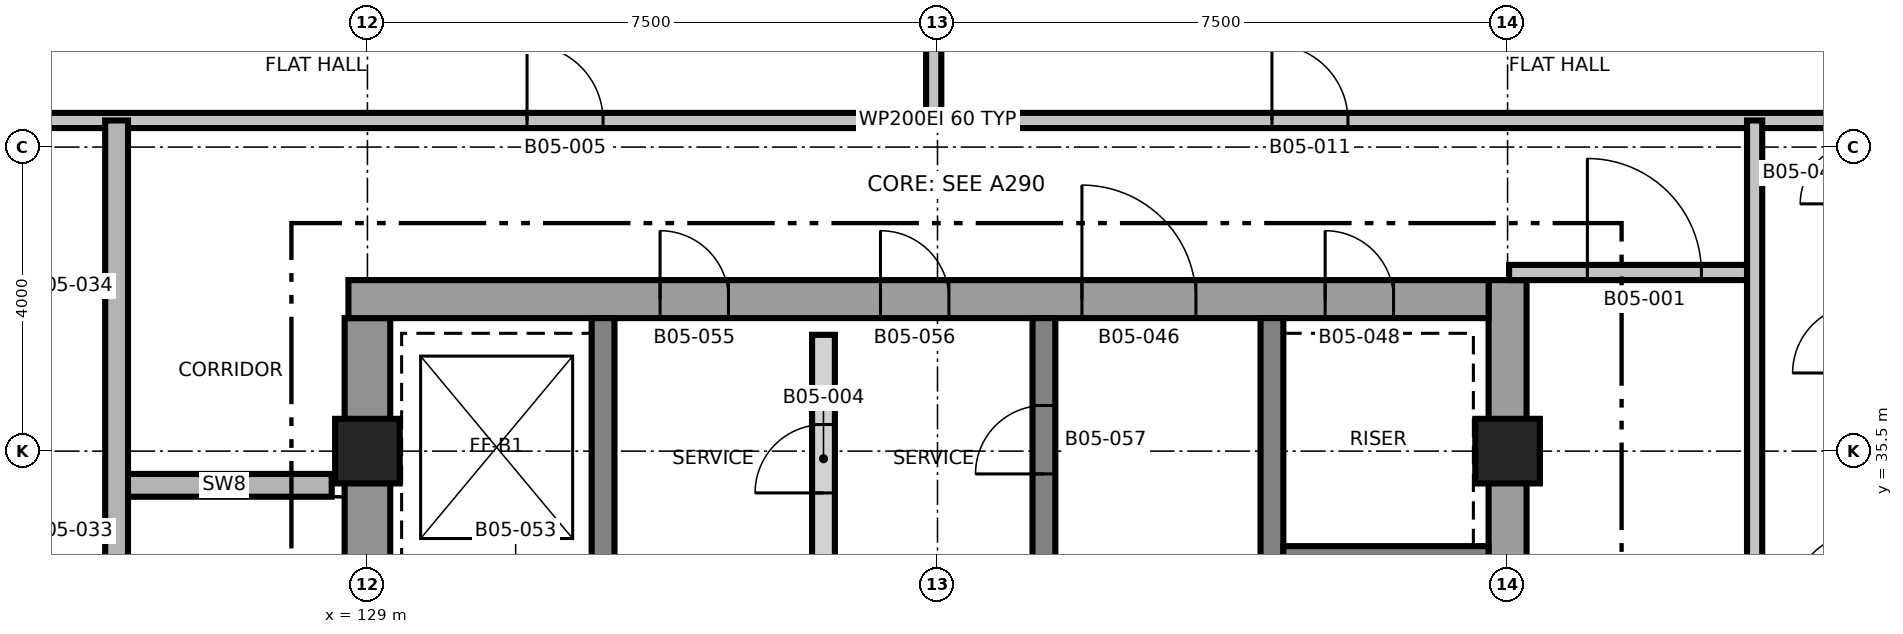
"""IFC4 building model, lengths in metres.
Left out: names, types, materials, properties, quantities, classifications, styles, units other than length and angle.
Written with IfcOpenShell. Run it as: python <this file> out.ifc"""

import sys

from ifc_helpers import new_model, si_unit, direction, frame, frame_2d, origin, origin_2d, place, context, subcontext, project, spatial, rectangle, extrude, element, fill, save


model = new_model("IFC4")
c1 = context("Model", 3, precision=1e-05, world=origin(), true_north=direction((0.0, 1.0)))
c2 = subcontext(c1, "Body", "Model", "MODEL_VIEW")
j1 = project(units=[si_unit("LENGTHUNIT", "METRE"), si_unit("PLANEANGLEUNIT", "RADIAN")], contexts=[c1])
p1 = place(None, origin())
s1 = spatial("IfcSite", under=j1, at=p1, CompositionType="ELEMENT")
p2 = place(p1, origin())
s2 = spatial("IfcBuilding", under=s1, at=p2, CompositionType="ELEMENT")
p3 = place(p2, frame((0.0, 0.0, 70.5)))
s3 = spatial("IfcBuildingStorey", under=s2, at=p3, CompositionType="ELEMENT", Elevation=70.5)
p4 = place(p3, frame((129.0, 24.75, 0.0), z_axis=(0.0, 0.0, 1.0), x_axis=(0.0, 1.0, 0.0)))
e1 = element("IfcWall", 1, at=p4, inside=s3, PredefinedType="SHEAR", context=c2, shape_type="SweptSolid", body=[
    extrude(rectangle(XDim=12.5, YDim=0.6, at=frame_2d((6.25, 0.0))), origin(), (0.0, 0.0, 1.0), 3.7),
])
p5 = place(p4, frame((5.15, 0.0, 0.0)))
e2 = element("IfcOpeningElement", 2, at=p5, cuts=e1, PredefinedType="OPENING", context=c2, shape_type="SweptSolid", body=[
    extrude(rectangle(XDim=1.0, YDim=2.1, at=frame_2d((0.5, 1.05))), frame((0.0, 0.31, 0.0), z_axis=(0.0, -1.0, 0.0), x_axis=(1.0, 0.0, 0.0)), (0.0, 0.0, 1.0), 0.62),
])
p6 = place(p3, frame((144.0, 24.25, 0.0), z_axis=(0.0, 0.0, 1.0), x_axis=(0.0, 1.0, 0.0)))
e3 = element("IfcWall", 3, at=p6, inside=s3, PredefinedType="SHEAR", context=c2, shape_type="SweptSolid", body=[
    extrude(rectangle(XDim=13.5, YDim=0.5, at=frame_2d((6.75, 0.0))), origin(), (0.0, 0.0, 1.0), 3.7),
])
p7 = place(p3, frame((128.75, 37.5, 0.0), z_axis=(0.0, 0.0, 1.0), x_axis=(1.0, 0.0, 0.0)))
e4 = element("IfcWall", 4, at=p7, inside=s3, PredefinedType="SHEAR", context=c2, shape_type="SweptSolid", body=[
    extrude(rectangle(XDim=15.0, YDim=0.5, at=frame_2d((7.5, 0.0))), origin(), (0.0, 0.0, 1.0), 3.7),
])
p8 = place(p7, frame((9.65, 0.0, 0.0)))
e5 = element("IfcOpeningElement", 5, at=p8, cuts=e4, PredefinedType="OPENING", context=c2, shape_type="SweptSolid", body=[
    extrude(rectangle(XDim=1.5, YDim=2.1, at=frame_2d((0.75, 1.05))), frame((0.0, 0.26, 0.0), z_axis=(0.0, -1.0, 0.0), x_axis=(1.0, 0.0, 0.0)), (0.0, 0.0, 1.0), 0.52),
])
p9 = place(p7, frame((12.85, 0.0, 0.0)))
e6 = element("IfcOpeningElement", 6, at=p9, cuts=e4, PredefinedType="OPENING", context=c2, shape_type="SweptSolid", body=[
    extrude(rectangle(XDim=0.9, YDim=2.1, at=frame_2d((0.45, 1.05))), frame((0.0, 0.26, 0.0), z_axis=(0.0, -1.0, 0.0), x_axis=(1.0, 0.0, 0.0)), (0.0, 0.0, 1.0), 0.52),
])
p10 = place(p7, frame((4.1, 0.0, 0.0)))
e7 = element("IfcOpeningElement", 7, at=p10, cuts=e4, PredefinedType="OPENING", context=c2, shape_type="SweptSolid", body=[
    extrude(rectangle(XDim=0.9, YDim=2.1, at=frame_2d((0.45, 1.05))), frame((0.0, 0.26, 0.0), z_axis=(0.0, -1.0, 0.0), x_axis=(1.0, 0.0, 0.0)), (0.0, 0.0, 1.0), 0.52),
])
p11 = place(p7, frame((7.0, 0.0, 0.0)))
e8 = element("IfcOpeningElement", 8, at=p11, cuts=e4, PredefinedType="OPENING", context=c2, shape_type="SweptSolid", body=[
    extrude(rectangle(XDim=0.9, YDim=2.1, at=frame_2d((0.45, 1.05))), frame((0.0, 0.26, 0.0), z_axis=(0.0, -1.0, 0.0), x_axis=(1.0, 0.0, 0.0)), (0.0, 0.0, 1.0), 0.52),
])
p12 = place(p3, frame((132.1, 24.75, 0.0), z_axis=(0.0, 0.0, 1.0), x_axis=(0.0, 1.0, 0.0)))
e9 = element("IfcWall", 9, at=p12, inside=s3, PredefinedType="SHEAR", context=c2, shape_type="SweptSolid", body=[
    extrude(rectangle(XDim=12.5, YDim=0.3, at=frame_2d((6.25, 0.0))), origin(), (0.0, 0.0, 1.0), 3.7),
])
p13 = place(p12, frame((3.9, 0.0, 0.0)))
e10 = element("IfcOpeningElement", 10, at=p13, cuts=e9, PredefinedType="OPENING", context=c2, shape_type="SweptSolid", body=[
    extrude(rectangle(XDim=1.2, YDim=2.1, at=frame_2d((0.6, 1.05))), frame((0.0, 0.16, 0.0), z_axis=(0.0, -1.0, 0.0), x_axis=(1.0, 0.0, 0.0)), (0.0, 0.0, 1.0), 0.32),
])
p14 = place(p3, frame((137.9, 24.75, 0.0), z_axis=(0.0, 0.0, 1.0), x_axis=(0.0, 1.0, 0.0)))
e11 = element("IfcWall", 11, at=p14, inside=s3, PredefinedType="SHEAR", context=c2, shape_type="SweptSolid", body=[
    extrude(rectangle(XDim=12.5, YDim=0.3, at=frame_2d((6.25, 0.0))), origin(), (0.0, 0.0, 1.0), 3.7),
])
p15 = place(p14, frame((3.95, 0.0, 0.0)))
e12 = element("IfcOpeningElement", 12, at=p15, cuts=e11, PredefinedType="OPENING", context=c2, shape_type="SweptSolid", body=[
    extrude(rectangle(XDim=1.5, YDim=2.1, at=frame_2d((0.75, 1.05))), frame((0.0, 0.16, 0.0), z_axis=(0.0, -1.0, 0.0), x_axis=(1.0, 0.0, 0.0)), (0.0, 0.0, 1.0), 0.32),
])
p16 = place(p14, frame((10.45, 0.0, 0.0)))
e13 = element("IfcOpeningElement", 13, at=p16, cuts=e11, PredefinedType="OPENING", context=c2, shape_type="SweptSolid", body=[
    extrude(rectangle(XDim=0.9, YDim=2.1, at=frame_2d((0.45, 1.05))), frame((0.0, 0.16, 0.0), z_axis=(0.0, -1.0, 0.0), x_axis=(1.0, 0.0, 0.0)), (0.0, 0.0, 1.0), 0.32),
])
p17 = place(p3, frame((140.9, 24.75, 0.0), z_axis=(0.0, 0.0, 1.0), x_axis=(0.0, 1.0, 0.0)))
e14 = element("IfcWall", 14, at=p17, inside=s3, PredefinedType="SHEAR", context=c2, shape_type="SweptSolid", body=[
    extrude(rectangle(XDim=12.5, YDim=0.3, at=frame_2d((6.25, 0.0))), origin(), (0.0, 0.0, 1.0), 3.7),
])
p18 = place(p17, frame((5.9, 0.0, 0.0)))
e15 = element("IfcOpeningElement", 15, at=p18, cuts=e14, PredefinedType="OPENING", context=c2, shape_type="SweptSolid", body=[
    extrude(rectangle(XDim=1.2, YDim=2.1, at=frame_2d((0.6, 1.05))), frame((0.0, 0.16, 0.0), z_axis=(0.0, -1.0, 0.0), x_axis=(1.0, 0.0, 0.0)), (0.0, 0.0, 1.0), 0.32),
])
p19 = place(p3, frame((141.05, 34.1, 0.0), z_axis=(0.0, 0.0, 1.0), x_axis=(1.0, 0.0, 0.0)))
e16 = element("IfcWall", 16, at=p19, inside=s3, PredefinedType="SHEAR", context=c2, shape_type="SweptSolid", body=[
    extrude(rectangle(XDim=2.7, YDim=0.3, at=frame_2d((1.35, 0.0))), origin(), (0.0, 0.0, 1.0), 3.7),
])
for number, where, z_axis, x_axis in (
    (17, (129.0, 35.5, 0.0), (0.0, 0.0, 1.0), (1.0, 0.0, 0.0)),
    (18, (144.0, 35.5, 0.0), (0.0, 0.0, 1.0), (1.0, 0.0, 0.0)),
):
    element("IfcColumn", number, at=place(p3, frame(where, z_axis=z_axis, x_axis=x_axis)), inside=s3, PredefinedType="COLUMN", context=c2, shape_type="SweptSolid", body=[
        extrude(rectangle(XDim=0.85, YDim=0.85, at=origin_2d()), origin(), (0.0, 0.0, 1.0), 3.7),
    ])
p20 = place(p3, frame((125.7, 35.05, 0.0), z_axis=(0.0, 0.0, 1.0), x_axis=(1.0, 0.0, 0.0)))
e19 = element("IfcWall", 19, at=p20, inside=s3, PredefinedType="SHEAR", context=c2, shape_type="SweptSolid", body=[
    extrude(rectangle(XDim=2.83, YDim=0.3, at=frame_2d((1.415, 0.0))), origin(), (0.0, 0.0, 1.0), 3.4),
])
p21 = place(p3, frame((144.02, 37.85, 0.0), z_axis=(0.0, 0.0, 1.0), x_axis=(1.0, 0.0, 0.0)))
e20 = element("IfcWall", 20, at=p21, inside=s3, PredefinedType="PARTITIONING", context=c2, shape_type="SweptSolid", body=[
    extrude(rectangle(XDim=3.23, YDim=0.2, at=frame_2d((1.615, 0.0))), origin(), (0.0, 0.0, 1.0), 3.4),
])
p22 = place(p21, frame((1.03, 0.0, 0.0)))
e21 = element("IfcOpeningElement", 21, at=p22, cuts=e20, PredefinedType="OPENING", context=c2, shape_type="SweptSolid", body=[
    extrude(rectangle(XDim=1.5, YDim=2.1, at=frame_2d((0.75, 1.05))), frame((0.0, 0.11, 0.0), z_axis=(0.0, -1.0, 0.0), x_axis=(1.0, 0.0, 0.0)), (0.0, 0.0, 1.0), 0.22),
])
p23 = place(p3, frame((120.07, 39.85, 0.0), z_axis=(0.0, 0.0, 1.0), x_axis=(1.0, 0.0, 0.0)))
e22 = element("IfcWall", 22, at=p23, inside=s3, PredefinedType="PARTITIONING", context=c2, shape_type="SweptSolid", body=[
    extrude(rectangle(XDim=32.86, YDim=0.2, at=frame_2d((16.43, 0.0))), origin(), (0.0, 0.0, 1.0), 3.4),
])
p24 = place(p23, frame((11.03, 0.0, 0.0)))
e23 = element("IfcOpeningElement", 23, at=p24, cuts=e22, PredefinedType="OPENING", context=c2, shape_type="SweptSolid", body=[
    extrude(rectangle(XDim=1.0, YDim=2.1, at=frame_2d((0.5, 1.05))), frame((0.0, 0.11, 0.0), z_axis=(0.0, -1.0, 0.0), x_axis=(1.0, 0.0, 0.0)), (0.0, 0.0, 1.0), 0.22),
])
p25 = place(p23, frame((20.83, 0.0, 0.0)))
e24 = element("IfcOpeningElement", 24, at=p25, cuts=e22, PredefinedType="OPENING", context=c2, shape_type="SweptSolid", body=[
    extrude(rectangle(XDim=1.0, YDim=2.1, at=frame_2d((0.5, 1.05))), frame((0.0, 0.11, 0.0), z_axis=(0.0, -1.0, 0.0), x_axis=(1.0, 0.0, 0.0)), (0.0, 0.0, 1.0), 0.22),
])
p26 = place(p3, frame((125.7, 22.15, 0.0), z_axis=(0.0, 0.0, 1.0), x_axis=(0.0, 1.0, 0.0)))
e25 = element("IfcWall", 25, at=p26, inside=s3, PredefinedType="SHEAR", context=c2, shape_type="SweptSolid", body=[
    extrude(rectangle(XDim=17.7, YDim=0.3, at=frame_2d((8.85, 0.0))), origin(), (0.0, 0.0, 1.0), 3.4),
])
p27 = place(p26, frame((2.7, 0.0, 0.0)))
e26 = element("IfcOpeningElement", 26, at=p27, cuts=e25, PredefinedType="OPENING", context=c2, shape_type="SweptSolid", body=[
    extrude(rectangle(XDim=1.0, YDim=2.1, at=frame_2d((0.5, 1.05))), frame((0.0, 0.16, 0.0), z_axis=(0.0, -1.0, 0.0), x_axis=(1.0, 0.0, 0.0)), (0.0, 0.0, 1.0), 0.32),
])
p28 = place(p3, frame((135.0, 33.77, 0.0), z_axis=(0.0, 0.0, 1.0), x_axis=(0.0, 1.0, 0.0)))
e27 = element("IfcWall", 27, at=p28, inside=s3, PredefinedType="PARTITIONING", context=c2, shape_type="SweptSolid", body=[
    extrude(rectangle(XDim=3.26, YDim=0.3, at=frame_2d((1.63, 0.0))), origin(), (0.0, 0.0, 1.0), 3.4),
])
p29 = place(p28, frame((1.18, 0.0, 0.0)))
e28 = element("IfcOpeningElement", 28, at=p29, cuts=e27, PredefinedType="OPENING", context=c2, shape_type="SweptSolid", body=[
    extrude(rectangle(XDim=0.9, YDim=2.1, at=frame_2d((0.45, 1.05))), frame((0.0, 0.16, 0.0), z_axis=(0.0, -1.0, 0.0), x_axis=(1.0, 0.0, 0.0)), (0.0, 0.0, 1.0), 0.32),
])
p30 = place(p3, frame((136.45, 39.85, 0.0), z_axis=(0.0, 0.0, 1.0), x_axis=(0.0, 1.0, 0.0)))
e29 = element("IfcWall", 29, at=p30, inside=s3, PredefinedType="PARTITIONING", context=c2, shape_type="SweptSolid", body=[
    extrude(rectangle(XDim=6.08, YDim=0.2, at=frame_2d((3.04, 0.0))), origin(), (0.0, 0.0, 1.0), 3.4),
])
p31 = place(p3, frame((147.25, 22.15, 0.0), z_axis=(0.0, 0.0, 1.0), x_axis=(0.0, 1.0, 0.0)))
e30 = element("IfcWall", 30, at=p31, inside=s3, PredefinedType="PARTITIONING", context=c2, shape_type="SweptSolid", body=[
    extrude(rectangle(XDim=17.7, YDim=0.2, at=frame_2d((8.85, 0.0))), origin(), (0.0, 0.0, 1.0), 3.4),
])
p32 = place(p31, frame((2.65, 0.0, 0.0)))
e31 = element("IfcOpeningElement", 31, at=p32, cuts=e30, PredefinedType="OPENING", context=c2, shape_type="SweptSolid", body=[
    extrude(rectangle(XDim=1.0, YDim=2.1, at=frame_2d((0.5, 1.05))), frame((0.0, 0.11, 0.0), z_axis=(0.0, -1.0, 0.0), x_axis=(1.0, 0.0, 0.0)), (0.0, 0.0, 1.0), 0.22),
])
p33 = place(p22, origin())
e32 = element("IfcDoor", 32, at=p33, inside=s3, OperationType="SINGLE_SWING_LEFT", PredefinedType="DOOR", context=c2, shape_type="SweptSolid", body=[
    extrude(rectangle(XDim=1.5, YDim=2.1, at=frame_2d((0.75, 1.05))), frame((0.0, 0.025, 0.0), z_axis=(0.0, -1.0, 0.0), x_axis=(1.0, 0.0, 0.0)), (0.0, 0.0, 1.0), 0.05),
])
fill(e21, e32)
p34 = place(p29, origin())
e33 = element("IfcDoor", 33, at=p34, inside=s3, OperationType="SINGLE_SWING_RIGHT", PredefinedType="DOOR", context=c2, shape_type="SweptSolid", body=[
    extrude(rectangle(XDim=0.9, YDim=2.1, at=frame_2d((0.45, 1.05))), frame((0.0, 0.025, 0.0), z_axis=(0.0, -1.0, 0.0), x_axis=(1.0, 0.0, 0.0)), (0.0, 0.0, 1.0), 0.05),
])
fill(e28, e33)
p35 = place(p24, origin())
e34 = element("IfcDoor", 34, at=p35, inside=s3, OperationType="SINGLE_SWING_LEFT", PredefinedType="DOOR", context=c2, shape_type="SweptSolid", body=[
    extrude(rectangle(XDim=1.0, YDim=2.1, at=frame_2d((0.5, 1.05))), frame((0.0, 0.025, 0.0), z_axis=(0.0, -1.0, 0.0), x_axis=(1.0, 0.0, 0.0)), (0.0, 0.0, 1.0), 0.05),
])
fill(e23, e34)
p36 = place(p25, origin())
e35 = element("IfcDoor", 35, at=p36, inside=s3, OperationType="SINGLE_SWING_LEFT", PredefinedType="DOOR", context=c2, shape_type="SweptSolid", body=[
    extrude(rectangle(XDim=1.0, YDim=2.1, at=frame_2d((0.5, 1.05))), frame((0.0, 0.025, 0.0), z_axis=(0.0, -1.0, 0.0), x_axis=(1.0, 0.0, 0.0)), (0.0, 0.0, 1.0), 0.05),
])
fill(e24, e35)
p37 = place(p8, origin())
e36 = element("IfcDoor", 36, at=p37, inside=s3, OperationType="SINGLE_SWING_RIGHT", PredefinedType="DOOR", context=c2, shape_type="SweptSolid", body=[
    extrude(rectangle(XDim=1.5, YDim=2.1, at=frame_2d((0.75, 1.05))), frame((0.0, 0.025, 0.0), z_axis=(0.0, -1.0, 0.0), x_axis=(1.0, 0.0, 0.0)), (0.0, 0.0, 1.0), 0.05),
])
fill(e5, e36)
p38 = place(p9, origin())
e37 = element("IfcDoor", 37, at=p38, inside=s3, OperationType="SINGLE_SWING_RIGHT", PredefinedType="DOOR", context=c2, shape_type="SweptSolid", body=[
    extrude(rectangle(XDim=0.9, YDim=2.1, at=frame_2d((0.45, 1.05))), frame((0.0, 0.025, 0.0), z_axis=(0.0, -1.0, 0.0), x_axis=(1.0, 0.0, 0.0)), (0.0, 0.0, 1.0), 0.05),
])
fill(e6, e37)
p39 = place(p10, origin())
e38 = element("IfcDoor", 38, at=p39, inside=s3, OperationType="SINGLE_SWING_LEFT", PredefinedType="DOOR", context=c2, shape_type="SweptSolid", body=[
    extrude(rectangle(XDim=0.9, YDim=2.1, at=frame_2d((0.45, 1.05))), frame((0.0, 0.025, 0.0), z_axis=(0.0, -1.0, 0.0), x_axis=(1.0, 0.0, 0.0)), (0.0, 0.0, 1.0), 0.05),
])
fill(e7, e38)
p40 = place(p11, origin())
e39 = element("IfcDoor", 39, at=p40, inside=s3, OperationType="SINGLE_SWING_RIGHT", PredefinedType="DOOR", context=c2, shape_type="SweptSolid", body=[
    extrude(rectangle(XDim=0.9, YDim=2.1, at=frame_2d((0.45, 1.05))), frame((0.0, 0.025, 0.0), z_axis=(0.0, -1.0, 0.0), x_axis=(1.0, 0.0, 0.0)), (0.0, 0.0, 1.0), 0.05),
])
fill(e8, e39)
p41 = place(p16, origin())
e40 = element("IfcDoor", 40, at=p41, inside=s3, OperationType="SINGLE_SWING_RIGHT", PredefinedType="DOOR", context=c2, shape_type="SweptSolid", body=[
    extrude(rectangle(XDim=0.9, YDim=2.1, at=frame_2d((0.45, 1.05))), frame((0.0, 0.025, 0.0), z_axis=(0.0, -1.0, 0.0), x_axis=(1.0, 0.0, 0.0)), (0.0, 0.0, 1.0), 0.05),
])
fill(e13, e40)
save(model, sys.argv[1])
